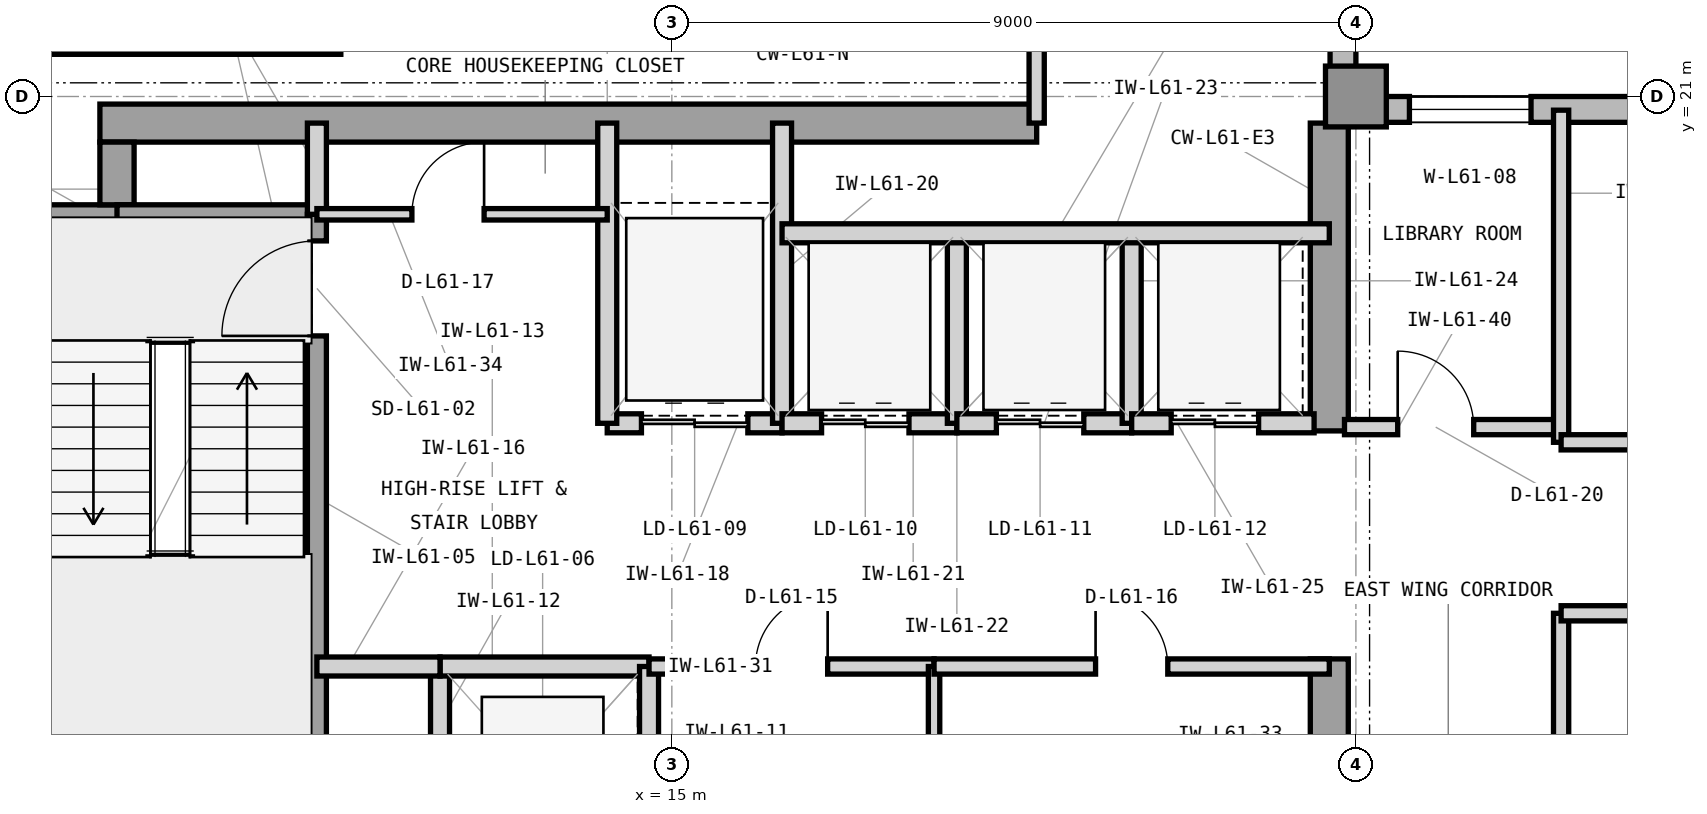
"""IFC4 building model, lengths in metres.
Left out: names, types, materials, properties, quantities, classifications, styles, units other than length and angle.
Written with IfcOpenShell. Run it as: python <this file> out.ifc"""

import sys

from ifc_helpers import new_model, si_unit, direction, frame, frame_2d, origin, origin_2d, place, context, subcontext, project, spatial, rectangle, extrude, element, fill, save


model = new_model("IFC4")
c1 = context("Model", 3, precision=1e-05, world=origin(), true_north=direction((0.0, 1.0)))
c2 = subcontext(c1, "Body", "Model", "MODEL_VIEW")
j1 = project(units=[si_unit("LENGTHUNIT", "METRE"), si_unit("PLANEANGLEUNIT", "RADIAN")], contexts=[c1])
p1 = place(None, origin())
s1 = spatial("IfcSite", under=j1, at=p1, CompositionType="ELEMENT")
p2 = place(p1, origin())
s2 = spatial("IfcBuilding", under=s1, at=p2, CompositionType="ELEMENT")
p3 = place(p2, frame((0.0, 0.0, 250.8)))
s3 = spatial("IfcBuildingStorey", under=s2, at=p3, CompositionType="ELEMENT", Elevation=250.8)
p4 = place(p3, frame((7.475, 20.65, 0.0), z_axis=(0.0, 0.0, 1.0), x_axis=(1.0, 0.0, 0.0)))
e1 = element("IfcWall", 1, at=p4, inside=s3, PredefinedType="SHEAR", context=c2, shape_type="SweptSolid", body=[
    extrude(rectangle(XDim=12.325, YDim=0.5, at=frame_2d((6.163, 0.0))), origin(), (0.0, 0.0, 1.0), 3.9),
])
p5 = place(p3, frame((23.65, 10.4, 0.0), z_axis=(0.0, 0.0, 1.0), x_axis=(0.0, 1.0, 0.0)))
e2 = element("IfcWall", 2, at=p5, inside=s3, PredefinedType="SHEAR", context=c2, shape_type="SweptSolid", body=[
    extrude(rectangle(XDim=3.2, YDim=0.5, at=frame_2d((1.6, 0.0))), origin(), (0.0, 0.0, 1.0), 3.9),
])
p6 = place(p3, frame((23.65, 16.6, 0.0), z_axis=(0.0, 0.0, 1.0), x_axis=(0.0, 1.0, 0.0)))
e3 = element("IfcWall", 3, at=p6, inside=s3, PredefinedType="SHEAR", context=c2, shape_type="SweptSolid", body=[
    extrude(rectangle(XDim=4.05, YDim=0.5, at=frame_2d((2.025, 0.0))), origin(), (0.0, 0.0, 1.0), 3.9),
])
p7 = place(p3, frame((6.6, 19.35, 0.0), z_axis=(0.0, 0.0, 1.0), x_axis=(1.0, 0.0, 0.0)))
e4 = element("IfcWall", 4, at=p7, inside=s3, PredefinedType="SHEAR", context=c2, shape_type="SweptSolid", body=[
    extrude(rectangle(XDim=1.325, YDim=0.45, at=frame_2d((0.663, 0.0))), origin(), (0.0, 0.0, 1.0), 3.9),
])
p8 = place(p3, frame((7.7, 19.575, 0.0), z_axis=(0.0, 0.0, 1.0), x_axis=(0.0, 1.0, 0.0)))
e5 = element("IfcWall", 5, at=p8, inside=s3, PredefinedType="SHEAR", context=c2, shape_type="SweptSolid", body=[
    extrude(rectangle(XDim=0.825, YDim=0.45, at=frame_2d((0.413, 0.0))), origin(), (0.0, 0.0, 1.0), 3.9),
])
p9 = place(p3, frame((24.0, 21.0, 0.0), z_axis=(0.0, 0.0, 1.0), x_axis=(1.0, 0.0, 0.0)))
e6 = element("IfcColumn", 6, at=p9, inside=s3, PredefinedType="COLUMN", context=c2, shape_type="SweptSolid", body=[
    extrude(rectangle(XDim=0.8, YDim=0.8, at=origin_2d()), origin(), (0.0, 0.0, 1.0), 3.9),
])
p10 = place(p3, frame((52.4, 20.83, 0.0), z_axis=(0.0, 0.0, 1.0), x_axis=(-1.0, 0.0, 0.0)))
e7 = element("IfcWall", 7, at=p10, inside=s3, PredefinedType="STANDARD", context=c2, shape_type="SweptSolid", body=[
    extrude(rectangle(XDim=28.4, YDim=0.34, at=frame_2d((14.2, 0.0))), origin(), (0.0, 0.0, 1.0), 3.715),
])
p11 = place(p10, frame((26.096, 0.0, 0.9)))
e8 = element("IfcOpeningElement", 8, at=p11, cuts=e7, PredefinedType="OPENING", context=c2, shape_type="SweptSolid", body=[
    extrude(rectangle(XDim=1.6, YDim=2.2, at=frame_2d((0.8, 1.1))), frame((0.0, 0.18, 0.0), z_axis=(0.0, -1.0, 0.0), x_axis=(1.0, 0.0, 0.0)), (0.0, 0.0, 1.0), 0.36),
])
p12 = place(p10, frame((11.375, 0.0, 0.9)))
e9 = element("IfcOpeningElement", 9, at=p12, cuts=e7, PredefinedType="OPENING", context=c2, shape_type="SweptSolid", body=[
    extrude(rectangle(XDim=2.3, YDim=2.2, at=frame_2d((1.15, 1.1))), frame((0.0, 0.18, 0.0), z_axis=(0.0, -1.0, 0.0), x_axis=(1.0, 0.0, 0.0)), (0.0, 0.0, 1.0), 0.36),
])
p13 = place(p3, frame((23.83, 21.0, 0.0), z_axis=(0.0, 0.0, 1.0), x_axis=(0.0, 1.0, 0.0)))
e10 = element("IfcWall", 10, at=p13, inside=s3, PredefinedType="STANDARD", context=c2, shape_type="SweptSolid", body=[
    extrude(rectangle(XDim=19.4, YDim=0.34, at=frame_2d((9.7, 0.0))), origin(), (0.0, 0.0, 1.0), 3.715),
])
p14 = place(p13, frame((10.975, 0.0, 0.9)))
e11 = element("IfcOpeningElement", 11, at=p14, cuts=e10, PredefinedType="OPENING", context=c2, shape_type="SweptSolid", body=[
    extrude(rectangle(XDim=2.3, YDim=2.2, at=frame_2d((1.15, 1.1))), frame((0.0, 0.18, 0.0), z_axis=(0.0, -1.0, 0.0), x_axis=(1.0, 0.0, 0.0)), (0.0, 0.0, 1.0), 0.36),
])
p15 = place(p3, frame((7.7, 19.45, 0.0), z_axis=(0.0, 0.0, 1.0), x_axis=(1.0, 0.0, 0.0)))
e12 = element("IfcWall", 12, at=p15, inside=s3, PredefinedType="SHEAR", context=c2, shape_type="SweptSolid", body=[
    extrude(rectangle(XDim=2.755, YDim=0.25, at=frame_2d((1.377, 0.0))), origin(), (0.0, 0.0, 1.0), 3.9),
])
p16 = place(p3, frame((10.33, 12.0, 0.0), z_axis=(0.0, 0.0, 1.0), x_axis=(0.0, 1.0, 0.0)))
e13 = element("IfcWall", 13, at=p16, inside=s3, PredefinedType="SHEAR", context=c2, shape_type="SweptSolid", body=[
    extrude(rectangle(XDim=7.45, YDim=0.25, at=frame_2d((3.725, 0.0))), origin(), (0.0, 0.0, 1.0), 3.9),
])
p17 = place(p16, frame((5.85, 0.0, 0.0)))
e14 = element("IfcOpeningElement", 14, at=p17, cuts=e13, PredefinedType="OPENING", context=c2, shape_type="SweptSolid", body=[
    extrude(rectangle(XDim=1.25, YDim=2.2, at=frame_2d((0.625, 1.1))), frame((0.0, 0.135, 0.0), z_axis=(0.0, -1.0, 0.0), x_axis=(1.0, 0.0, 0.0)), (0.0, 0.0, 1.0), 0.27),
])
p18 = place(p3, frame((10.33, 19.45, 0.0), z_axis=(0.0, 0.0, 1.0), x_axis=(0.0, 1.0, 0.0)))
e15 = element("IfcWall", 15, at=p18, inside=s3, PredefinedType="PARTITIONING", context=c2, shape_type="SweptSolid", body=[
    extrude(rectangle(XDim=1.2, YDim=0.25, at=frame_2d((0.6, 0.0))), origin(), (0.0, 0.0, 1.0), 3.63),
])
p19 = place(p3, frame((11.95, 10.5, 0.0), z_axis=(0.0, 0.0, 1.0), x_axis=(0.0, 1.0, 0.0)))
e16 = element("IfcWall", 16, at=p19, inside=s3, PredefinedType="PARTITIONING", context=c2, shape_type="SweptSolid", body=[
    extrude(rectangle(XDim=3.0, YDim=0.25, at=frame_2d((1.5, 0.0))), origin(), (0.0, 0.0, 1.0), 3.63),
])
p20 = place(p3, frame((11.95, 13.5, 0.0), z_axis=(0.0, 0.0, 1.0), x_axis=(1.0, 0.0, 0.0)))
e17 = element("IfcWall", 17, at=p20, inside=s3, PredefinedType="PARTITIONING", context=c2, shape_type="SweptSolid", body=[
    extrude(rectangle(XDim=2.75, YDim=0.25, at=frame_2d((1.375, 0.0))), origin(), (0.0, 0.0, 1.0), 3.088),
])
p21 = place(p3, frame((14.7, 10.5, 0.0), z_axis=(0.0, 0.0, 1.0), x_axis=(0.0, 1.0, 0.0)))
e18 = element("IfcWall", 18, at=p21, inside=s3, PredefinedType="PARTITIONING", context=c2, shape_type="SweptSolid", body=[
    extrude(rectangle(XDim=3.0, YDim=0.25, at=frame_2d((1.5, 0.0))), origin(), (0.0, 0.0, 1.0), 3.63),
])
p22 = place(p3, frame((10.33, 13.5, 0.0), z_axis=(0.0, 0.0, 1.0), x_axis=(1.0, 0.0, 0.0)))
e19 = element("IfcWall", 19, at=p22, inside=s3, PredefinedType="PARTITIONING", context=c2, shape_type="SweptSolid", body=[
    extrude(rectangle(XDim=1.62, YDim=0.25, at=frame_2d((0.81, 0.0))), origin(), (0.0, 0.0, 1.0), 3.088),
])
p23 = place(p3, frame((14.15, 16.7, 0.0), z_axis=(0.0, 0.0, 1.0), x_axis=(1.0, 0.0, 0.0)))
e20 = element("IfcWall", 20, at=p23, inside=s3, PredefinedType="PARTITIONING", context=c2, shape_type="SweptSolid", body=[
    extrude(rectangle(XDim=2.3, YDim=0.25, at=frame_2d((1.15, 0.0))), origin(), (0.0, 0.0, 1.0), 3.088),
])
p24 = place(p23, frame((0.45, 0.0, 0.0)))
e21 = element("IfcOpeningElement", 21, at=p24, cuts=e20, PredefinedType="OPENING", context=c2, shape_type="SweptSolid", body=[
    extrude(rectangle(XDim=1.4, YDim=2.35, at=frame_2d((0.7, 1.175))), frame((0.0, 0.135, 0.0), z_axis=(0.0, -1.0, 0.0), x_axis=(1.0, 0.0, 0.0)), (0.0, 0.0, 1.0), 0.27),
])
for number, where, z_axis, x_axis in (
    (22, (14.15, 16.7, 0.0), (0.0, 0.0, 1.0), (0.0, 1.0, 0.0)),
    (23, (16.45, 16.7, 0.0), (0.0, 0.0, 1.0), (0.0, 1.0, 0.0)),
):
    element("IfcWall", number, at=place(p3, frame(where, z_axis=z_axis, x_axis=x_axis)), inside=s3, PredefinedType="PARTITIONING", context=c2, shape_type="SweptSolid", body=[
        extrude(rectangle(XDim=3.95, YDim=0.25, at=frame_2d((1.975, 0.0))), origin(), (0.0, 0.0, 1.0), 3.63),
    ])
p25 = place(p3, frame((16.45, 16.7, 0.0), z_axis=(0.0, 0.0, 1.0), x_axis=(1.0, 0.0, 0.0)))
e24 = element("IfcWall", 24, at=p25, inside=s3, PredefinedType="PARTITIONING", context=c2, shape_type="SweptSolid", body=[
    extrude(rectangle(XDim=2.3, YDim=0.25, at=frame_2d((1.15, 0.0))), origin(), (0.0, 0.0, 1.0), 3.088),
])
p26 = place(p25, frame((0.52, 0.0, 0.0)))
e25 = element("IfcOpeningElement", 25, at=p26, cuts=e24, PredefinedType="OPENING", context=c2, shape_type="SweptSolid", body=[
    extrude(rectangle(XDim=1.15, YDim=2.25, at=frame_2d((0.575, 1.125))), frame((0.0, 0.135, 0.0), z_axis=(0.0, -1.0, 0.0), x_axis=(1.0, 0.0, 0.0)), (0.0, 0.0, 1.0), 0.27),
])
p27 = place(p3, frame((18.75, 16.7, 0.0), z_axis=(0.0, 0.0, 1.0), x_axis=(0.0, 1.0, 0.0)))
e26 = element("IfcWall", 26, at=p27, inside=s3, PredefinedType="PARTITIONING", context=c2, shape_type="SweptSolid", body=[
    extrude(rectangle(XDim=2.5, YDim=0.25, at=frame_2d((1.25, 0.0))), origin(), (0.0, 0.0, 1.0), 3.63),
])
p28 = place(p3, frame((18.75, 16.7, 0.0), z_axis=(0.0, 0.0, 1.0), x_axis=(1.0, 0.0, 0.0)))
e27 = element("IfcWall", 27, at=p28, inside=s3, PredefinedType="PARTITIONING", context=c2, shape_type="SweptSolid", body=[
    extrude(rectangle(XDim=2.3, YDim=0.25, at=frame_2d((1.15, 0.0))), origin(), (0.0, 0.0, 1.0), 3.088),
])
p29 = place(p28, frame((0.52, 0.0, 0.0)))
e28 = element("IfcOpeningElement", 28, at=p29, cuts=e27, PredefinedType="OPENING", context=c2, shape_type="SweptSolid", body=[
    extrude(rectangle(XDim=1.15, YDim=2.25, at=frame_2d((0.575, 1.125))), frame((0.0, 0.135, 0.0), z_axis=(0.0, -1.0, 0.0), x_axis=(1.0, 0.0, 0.0)), (0.0, 0.0, 1.0), 0.27),
])
p30 = place(p3, frame((21.05, 16.7, 0.0), z_axis=(0.0, 0.0, 1.0), x_axis=(0.0, 1.0, 0.0)))
e29 = element("IfcWall", 29, at=p30, inside=s3, PredefinedType="PARTITIONING", context=c2, shape_type="SweptSolid", body=[
    extrude(rectangle(XDim=2.5, YDim=0.25, at=frame_2d((1.25, 0.0))), origin(), (0.0, 0.0, 1.0), 3.63),
])
p31 = place(p3, frame((21.05, 16.7, 0.0), z_axis=(0.0, 0.0, 1.0), x_axis=(1.0, 0.0, 0.0)))
e30 = element("IfcWall", 30, at=p31, inside=s3, PredefinedType="PARTITIONING", context=c2, shape_type="SweptSolid", body=[
    extrude(rectangle(XDim=2.4, YDim=0.25, at=frame_2d((1.2, 0.0))), origin(), (0.0, 0.0, 1.0), 3.088),
])
p32 = place(p31, frame((0.52, 0.0, 0.0)))
e31 = element("IfcOpeningElement", 31, at=p32, cuts=e30, PredefinedType="OPENING", context=c2, shape_type="SweptSolid", body=[
    extrude(rectangle(XDim=1.15, YDim=2.25, at=frame_2d((0.575, 1.125))), frame((0.0, 0.135, 0.0), z_axis=(0.0, -1.0, 0.0), x_axis=(1.0, 0.0, 0.0)), (0.0, 0.0, 1.0), 0.27),
])
p33 = place(p3, frame((16.45, 19.2, 0.0), z_axis=(0.0, 0.0, 1.0), x_axis=(1.0, 0.0, 0.0)))
e32 = element("IfcWall", 32, at=p33, inside=s3, PredefinedType="PARTITIONING", context=c2, shape_type="SweptSolid", body=[
    extrude(rectangle(XDim=7.2, YDim=0.25, at=frame_2d((3.6, 0.0))), origin(), (0.0, 0.0, 1.0), 3.63),
])
p34 = place(p3, frame((14.7, 13.5, 0.0), z_axis=(0.0, 0.0, 1.0), x_axis=(1.0, 0.0, 0.0)))
e33 = element("IfcWall", 33, at=p34, inside=s3, PredefinedType="PARTITIONING", context=c2, shape_type="SweptSolid", body=[
    extrude(rectangle(XDim=3.75, YDim=0.2, at=frame_2d((1.875, 0.0))), origin(), (0.0, 0.0, 1.0), 3.088),
])
p35 = place(p34, frame((1.4, 0.0, 0.0)))
e34 = element("IfcOpeningElement", 34, at=p35, cuts=e33, PredefinedType="OPENING", context=c2, shape_type="SweptSolid", body=[
    extrude(rectangle(XDim=0.95, YDim=2.1, at=frame_2d((0.475, 1.05))), frame((0.0, 0.11, 0.0), z_axis=(0.0, -1.0, 0.0), x_axis=(1.0, 0.0, 0.0)), (0.0, 0.0, 1.0), 0.22),
])
p36 = place(p3, frame((18.45, 10.34, 0.0), z_axis=(0.0, 0.0, 1.0), x_axis=(0.0, 1.0, 0.0)))
e35 = element("IfcWall", 35, at=p36, inside=s3, PredefinedType="PARTITIONING", context=c2, shape_type="SweptSolid", body=[
    extrude(rectangle(XDim=3.16, YDim=0.15, at=frame_2d((1.58, 0.0))), origin(), (0.0, 0.0, 1.0), 3.63),
])
p37 = place(p3, frame((18.45, 13.5, 0.0), z_axis=(0.0, 0.0, 1.0), x_axis=(1.0, 0.0, 0.0)))
e36 = element("IfcWall", 36, at=p37, inside=s3, PredefinedType="PARTITIONING", context=c2, shape_type="SweptSolid", body=[
    extrude(rectangle(XDim=5.2, YDim=0.2, at=frame_2d((2.6, 0.0))), origin(), (0.0, 0.0, 1.0), 3.088),
])
p38 = place(p37, frame((2.125, 0.0, 0.0)))
e37 = element("IfcOpeningElement", 37, at=p38, cuts=e36, PredefinedType="OPENING", context=c2, shape_type="SweptSolid", body=[
    extrude(rectangle(XDim=0.95, YDim=2.1, at=frame_2d((0.475, 1.05))), frame((0.0, 0.11, 0.0), z_axis=(0.0, -1.0, 0.0), x_axis=(1.0, 0.0, 0.0)), (0.0, 0.0, 1.0), 0.22),
])
p39 = place(p3, frame((10.33, 19.45, 0.0), z_axis=(0.0, 0.0, 1.0), x_axis=(1.0, 0.0, 0.0)))
e38 = element("IfcWall", 38, at=p39, inside=s3, PredefinedType="PARTITIONING", context=c2, shape_type="SweptSolid", body=[
    extrude(rectangle(XDim=3.82, YDim=0.15, at=frame_2d((1.91, 0.0))), origin(), (0.0, 0.0, 1.0), 3.63),
])
p40 = place(p39, frame((1.25, 0.0, 0.0)))
e39 = element("IfcOpeningElement", 39, at=p40, cuts=e38, PredefinedType="OPENING", context=c2, shape_type="SweptSolid", body=[
    extrude(rectangle(XDim=0.95, YDim=2.1, at=frame_2d((0.475, 1.05))), frame((0.0, 0.085, 0.0), z_axis=(0.0, -1.0, 0.0), x_axis=(1.0, 0.0, 0.0)), (0.0, 0.0, 1.0), 0.17),
])
p41 = place(p3, frame((6.555, 21.68, 0.0), z_axis=(0.0, 0.0, 1.0), x_axis=(1.0, 0.0, 0.0)))
e40 = element("IfcWall", 40, at=p41, inside=s3, PredefinedType="SHEAR", context=c2, shape_type="SweptSolid", body=[
    extrude(rectangle(XDim=4.09, YDim=0.25, at=frame_2d((2.045, 0.0))), origin(), (0.0, 0.0, 1.0), 3.9),
])
p42 = place(p3, frame((23.85, 16.65, 0.0), z_axis=(0.0, 0.0, 1.0), x_axis=(1.0, 0.0, 0.0)))
e41 = element("IfcWall", 41, at=p42, inside=s3, PredefinedType="PARTITIONING", context=c2, shape_type="SweptSolid", body=[
    extrude(rectangle(XDim=2.85, YDim=0.2, at=frame_2d((1.425, 0.0))), origin(), (0.0, 0.0, 1.0), 3.63),
])
p43 = place(p42, frame((0.7, 0.0, 0.0)))
e42 = element("IfcOpeningElement", 42, at=p43, cuts=e41, PredefinedType="OPENING", context=c2, shape_type="SweptSolid", body=[
    extrude(rectangle(XDim=1.0, YDim=2.15, at=frame_2d((0.5, 1.075))), frame((0.0, 0.11, 0.0), z_axis=(0.0, -1.0, 0.0), x_axis=(1.0, 0.0, 0.0)), (0.0, 0.0, 1.0), 0.22),
])
p44 = place(p3, frame((26.7, 3.18, 0.0), z_axis=(0.0, 0.0, 1.0), x_axis=(0.0, 1.0, 0.0)))
e43 = element("IfcWall", 43, at=p44, inside=s3, PredefinedType="PARTITIONING", context=c2, shape_type="SweptSolid", body=[
    extrude(rectangle(XDim=11.02, YDim=0.2, at=frame_2d((5.51, 0.0))), origin(), (0.0, 0.0, 1.0), 3.63),
])
p45 = place(p3, frame((26.7, 16.45, 0.0), z_axis=(0.0, 0.0, 1.0), x_axis=(0.0, 1.0, 0.0)))
e44 = element("IfcWall", 44, at=p45, inside=s3, PredefinedType="PARTITIONING", context=c2, shape_type="SweptSolid", body=[
    extrude(rectangle(XDim=4.37, YDim=0.2, at=frame_2d((2.185, 0.0))), origin(), (0.0, 0.0, 1.0), 3.63),
])
p46 = place(p3, frame((26.7, 14.2, 0.0), z_axis=(0.0, 0.0, 1.0), x_axis=(1.0, 0.0, 0.0)))
e45 = element("IfcWall", 45, at=p46, inside=s3, PredefinedType="PARTITIONING", context=c2, shape_type="SweptSolid", body=[
    extrude(rectangle(XDim=7.5, YDim=0.2, at=frame_2d((3.75, 0.0))), origin(), (0.0, 0.0, 1.0), 3.63),
])
p47 = place(p46, frame((2.75, 0.0, 0.0)))
e46 = element("IfcOpeningElement", 46, at=p47, cuts=e45, PredefinedType="OPENING", context=c2, shape_type="SweptSolid", body=[
    extrude(rectangle(XDim=2.0, YDim=2.5, at=frame_2d((1.0, 1.25))), frame((0.0, 0.11, 0.0), z_axis=(0.0, -1.0, 0.0), x_axis=(1.0, 0.0, 0.0)), (0.0, 0.0, 1.0), 0.22),
])
p48 = place(p3, frame((26.7, 16.45, 0.0), z_axis=(0.0, 0.0, 1.0), x_axis=(1.0, 0.0, 0.0)))
e47 = element("IfcWall", 47, at=p48, inside=s3, PredefinedType="PARTITIONING", context=c2, shape_type="SweptSolid", body=[
    extrude(rectangle(XDim=10.0, YDim=0.2, at=frame_2d((5.0, 0.0))), origin(), (0.0, 0.0, 1.0), 3.63),
])
p49 = place(p48, frame((4.5, 0.0, 0.0)))
e48 = element("IfcOpeningElement", 48, at=p49, cuts=e47, PredefinedType="OPENING", context=c2, shape_type="SweptSolid", body=[
    extrude(rectangle(XDim=1.0, YDim=2.15, at=frame_2d((0.5, 1.075))), frame((0.0, 0.11, 0.0), z_axis=(0.0, -1.0, 0.0), x_axis=(1.0, 0.0, 0.0)), (0.0, 0.0, 1.0), 0.22),
])
p50 = place(p3, frame((19.8, 20.65, 0.0), z_axis=(0.0, 0.0, 1.0), x_axis=(0.0, 1.0, 0.0)))
e49 = element("IfcWall", 49, at=p50, inside=s3, PredefinedType="PARTITIONING", context=c2, shape_type="SweptSolid", body=[
    extrude(rectangle(XDim=6.15, YDim=0.2, at=frame_2d((3.075, 0.0))), origin(), (0.0, 0.0, 1.0), 3.63),
])
p51 = place(p17, origin())
e50 = element("IfcDoor", 50, at=p51, inside=s3, OperationType="SINGLE_SWING_LEFT", PredefinedType="DOOR", context=c2, shape_type="SweptSolid", body=[
    extrude(rectangle(XDim=1.25, YDim=2.2, at=frame_2d((0.625, 1.1))), frame((0.0, 0.025, 0.0), z_axis=(0.0, -1.0, 0.0), x_axis=(1.0, 0.0, 0.0)), (0.0, 0.0, 1.0), 0.05),
])
fill(e14, e50)
p52 = place(p24, origin())
e51 = element("IfcDoor", 51, at=p52, inside=s3, OperationType="DOUBLE_DOOR_SLIDING", PredefinedType="DOOR", context=c2, shape_type="SweptSolid", body=[
    extrude(rectangle(XDim=1.4, YDim=2.35, at=frame_2d((0.7, 1.175))), frame((0.0, 0.025, 0.0), z_axis=(0.0, -1.0, 0.0), x_axis=(1.0, 0.0, 0.0)), (0.0, 0.0, 1.0), 0.05),
])
fill(e21, e51)
p53 = place(p26, origin())
e52 = element("IfcDoor", 52, at=p53, inside=s3, OperationType="DOUBLE_DOOR_SLIDING", PredefinedType="DOOR", context=c2, shape_type="SweptSolid", body=[
    extrude(rectangle(XDim=1.15, YDim=2.25, at=frame_2d((0.575, 1.125))), frame((0.0, 0.025, 0.0), z_axis=(0.0, -1.0, 0.0), x_axis=(1.0, 0.0, 0.0)), (0.0, 0.0, 1.0), 0.05),
])
fill(e25, e52)
p54 = place(p29, origin())
e53 = element("IfcDoor", 53, at=p54, inside=s3, OperationType="DOUBLE_DOOR_SLIDING", PredefinedType="DOOR", context=c2, shape_type="SweptSolid", body=[
    extrude(rectangle(XDim=1.15, YDim=2.25, at=frame_2d((0.575, 1.125))), frame((0.0, 0.025, 0.0), z_axis=(0.0, -1.0, 0.0), x_axis=(1.0, 0.0, 0.0)), (0.0, 0.0, 1.0), 0.05),
])
fill(e28, e53)
p55 = place(p32, origin())
e54 = element("IfcDoor", 54, at=p55, inside=s3, OperationType="DOUBLE_DOOR_SLIDING", PredefinedType="DOOR", context=c2, shape_type="SweptSolid", body=[
    extrude(rectangle(XDim=1.15, YDim=2.25, at=frame_2d((0.575, 1.125))), frame((0.0, 0.025, 0.0), z_axis=(0.0, -1.0, 0.0), x_axis=(1.0, 0.0, 0.0)), (0.0, 0.0, 1.0), 0.05),
])
fill(e31, e54)
p56 = place(p35, origin())
e55 = element("IfcDoor", 55, at=p56, inside=s3, OperationType="SINGLE_SWING_RIGHT", PredefinedType="DOOR", context=c2, shape_type="SweptSolid", body=[
    extrude(rectangle(XDim=0.95, YDim=2.1, at=frame_2d((0.475, 1.05))), frame((0.0, 0.025, 0.0), z_axis=(0.0, -1.0, 0.0), x_axis=(1.0, 0.0, 0.0)), (0.0, 0.0, 1.0), 0.05),
])
fill(e34, e55)
p57 = place(p38, origin())
e56 = element("IfcDoor", 56, at=p57, inside=s3, OperationType="SINGLE_SWING_LEFT", PredefinedType="DOOR", context=c2, shape_type="SweptSolid", body=[
    extrude(rectangle(XDim=0.95, YDim=2.1, at=frame_2d((0.475, 1.05))), frame((0.0, 0.025, 0.0), z_axis=(0.0, -1.0, 0.0), x_axis=(1.0, 0.0, 0.0)), (0.0, 0.0, 1.0), 0.05),
])
fill(e37, e56)
p58 = place(p40, origin())
e57 = element("IfcDoor", 57, at=p58, inside=s3, OperationType="SINGLE_SWING_RIGHT", PredefinedType="DOOR", context=c2, shape_type="SweptSolid", body=[
    extrude(rectangle(XDim=0.95, YDim=2.1, at=frame_2d((0.475, 1.05))), frame((0.0, 0.025, 0.0), z_axis=(0.0, -1.0, 0.0), x_axis=(1.0, 0.0, 0.0)), (0.0, 0.0, 1.0), 0.05),
])
fill(e39, e57)
p59 = place(p43, origin())
e58 = element("IfcDoor", 58, at=p59, inside=s3, OperationType="SINGLE_SWING_LEFT", PredefinedType="DOOR", context=c2, shape_type="SweptSolid", body=[
    extrude(rectangle(XDim=1.0, YDim=2.15, at=frame_2d((0.5, 1.075))), frame((0.0, 0.025, 0.0), z_axis=(0.0, -1.0, 0.0), x_axis=(1.0, 0.0, 0.0)), (0.0, 0.0, 1.0), 0.05),
])
fill(e42, e58)
p60 = place(p11, origin())
e59 = element("IfcWindow", 59, at=p60, inside=s3, PartitioningType="SINGLE_PANEL", PredefinedType="WINDOW", context=c2, shape_type="SweptSolid", body=[
    extrude(rectangle(XDim=1.6, YDim=2.2, at=frame_2d((0.8, 1.1))), frame((0.0, 0.11, 0.0), z_axis=(0.0, -1.0, 0.0), x_axis=(1.0, 0.0, 0.0)), (0.0, 0.0, 1.0), 0.06),
])
fill(e8, e59)
save(model, sys.argv[1])
